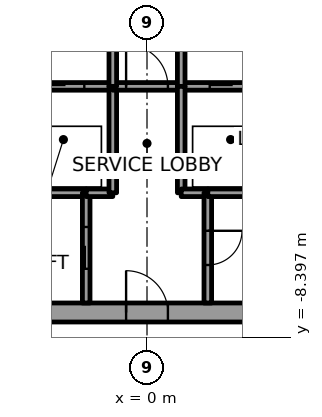
"""IFC4 building model, lengths in metres.
Left out: names, types, materials, properties, quantities, classifications, styles, units other than length and angle.
Written with IfcOpenShell. Run it as: python <this file> out.ifc"""

import sys

from ifc_helpers import new_model, si_unit, direction, frame, frame_2d, origin, place, context, subcontext, project, spatial, rectangle, extrude, element, fill, save


model = new_model("IFC4")
c1 = context("Model", 3, precision=1e-05, world=origin(), true_north=direction((0.0, 1.0)))
c2 = subcontext(c1, "Body", "Model", "MODEL_VIEW")
j1 = project(units=[si_unit("LENGTHUNIT", "METRE"), si_unit("PLANEANGLEUNIT", "RADIAN")], contexts=[c1])
p1 = place(None, origin())
s1 = spatial("IfcSite", under=j1, at=p1, CompositionType="ELEMENT")
p2 = place(p1, origin())
s2 = spatial("IfcBuilding", under=s1, at=p2, CompositionType="ELEMENT")
p3 = place(p2, frame((0.0, 0.0, 92.4)))
s3 = spatial("IfcBuildingStorey", under=s2, at=p3, CompositionType="ELEMENT", Elevation=92.4)
p4 = place(p3, frame((-11.0, -7.75, 0.0), z_axis=(0.0, 0.0, 1.0), x_axis=(1.0, 0.0, 0.0)))
e1 = element("IfcWall", 1, at=p4, inside=s3, PredefinedType="SHEAR", context=c2, shape_type="SweptSolid", body=[
    extrude(rectangle(XDim=22.0, YDim=0.5, at=frame_2d((11.0, 0.0))), origin(), (0.0, 0.0, 1.0), 3.7),
])
p5 = place(p4, frame((10.45, 0.0, 0.0)))
e2 = element("IfcOpeningElement", 2, at=p5, cuts=e1, PredefinedType="OPENING", context=c2, shape_type="SweptSolid", body=[
    extrude(rectangle(XDim=1.1, YDim=2.1, at=frame_2d((0.55, 1.05))), frame((0.0, 0.25, 0.0), z_axis=(0.0, -1.0, 0.0), x_axis=(1.0, 0.0, 0.0)), (0.0, 0.0, 1.0), 0.5),
])
p6 = place(p3, frame((-3.5, -4.6, 0.0), z_axis=(0.0, 0.0, 1.0), x_axis=(1.0, 0.0, 0.0)))
e3 = element("IfcWall", 3, at=p6, inside=s3, PredefinedType="SOLIDWALL", context=c2, shape_type="SweptSolid", body=[
    extrude(rectangle(XDim=1.9, YDim=0.2, at=frame_2d((0.95, 0.0))), origin(), (0.0, 0.0, 1.0), 3.55),
])
p7 = place(p3, frame((-3.5, -1.8, 0.0), z_axis=(0.0, 0.0, 1.0), x_axis=(1.0, 0.0, 0.0)))
e4 = element("IfcWall", 4, at=p7, inside=s3, PredefinedType="SOLIDWALL", context=c2, shape_type="SweptSolid", body=[
    extrude(rectangle(XDim=2.6, YDim=0.2, at=frame_2d((1.3, 0.0))), origin(), (0.0, 0.0, 1.0), 3.55),
])
p8 = place(p7, frame((0.75, 0.0, 0.0)))
e5 = element("IfcOpeningElement", 5, at=p8, cuts=e4, PredefinedType="OPENING", context=c2, shape_type="SweptSolid", body=[
    extrude(rectangle(XDim=1.1, YDim=2.1, at=frame_2d((0.55, 1.05))), frame((0.0, 0.1, 0.0), z_axis=(0.0, -1.0, 0.0), x_axis=(1.0, 0.0, 0.0)), (0.0, 0.0, 1.0), 0.2),
])
p9 = place(p3, frame((-1.6, -7.5, 0.0), z_axis=(0.0, 0.0, 1.0), x_axis=(0.0, 1.0, 0.0)))
e6 = element("IfcWall", 6, at=p9, inside=s3, PredefinedType="SOLIDWALL", context=c2, shape_type="SweptSolid", body=[
    extrude(rectangle(XDim=2.9, YDim=0.2, at=frame_2d((1.45, 0.0))), origin(), (0.0, 0.0, 1.0), 3.55),
])
p10 = place(p9, frame((0.9, 0.0, 0.0)))
e7 = element("IfcOpeningElement", 7, at=p10, cuts=e6, PredefinedType="OPENING", context=c2, shape_type="SweptSolid", body=[
    extrude(rectangle(XDim=1.1, YDim=2.1, at=frame_2d((0.55, 1.05))), frame((0.0, 0.1, 0.0), z_axis=(0.0, -1.0, 0.0), x_axis=(1.0, 0.0, 0.0)), (0.0, 0.0, 1.0), 0.2),
])
p11 = place(p3, frame((-1.6, -4.6, 0.0), z_axis=(0.0, 0.0, 1.0), x_axis=(1.0, 0.0, 0.0)))
e8 = element("IfcWall", 8, at=p11, inside=s3, PredefinedType="SOLIDWALL", context=c2, shape_type="SweptSolid", body=[
    extrude(rectangle(XDim=0.7, YDim=0.2, at=frame_2d((0.35, 0.0))), origin(), (0.0, 0.0, 1.0), 3.55),
])
p12 = place(p3, frame((-0.9, -4.6, 0.0), z_axis=(0.0, 0.0, 1.0), x_axis=(0.0, 1.0, 0.0)))
e9 = element("IfcWall", 9, at=p12, inside=s3, PredefinedType="SOLIDWALL", context=c2, shape_type="SweptSolid", body=[
    extrude(rectangle(XDim=2.8, YDim=0.2, at=frame_2d((1.4, 0.0))), origin(), (0.0, 0.0, 1.0), 3.55),
])
p13 = place(p3, frame((-0.9, -1.8, 0.0), z_axis=(0.0, 0.0, 1.0), x_axis=(1.0, 0.0, 0.0)))
e10 = element("IfcWall", 10, at=p13, inside=s3, PredefinedType="SOLIDWALL", context=c2, shape_type="SweptSolid", body=[
    extrude(rectangle(XDim=1.8, YDim=0.2, at=frame_2d((0.9, 0.0))), origin(), (0.0, 0.0, 1.0), 3.55),
])
p14 = place(p13, frame((0.35, 0.0, 0.0)))
e11 = element("IfcOpeningElement", 11, at=p14, cuts=e10, PredefinedType="OPENING", context=c2, shape_type="SweptSolid", body=[
    extrude(rectangle(XDim=1.1, YDim=2.1, at=frame_2d((0.55, 1.05))), frame((0.0, 0.1, 0.0), z_axis=(0.0, -1.0, 0.0), x_axis=(1.0, 0.0, 0.0)), (0.0, 0.0, 1.0), 0.2),
])
p15 = place(p3, frame((-0.9, 1.8, 0.0), z_axis=(0.0, 0.0, 1.0), x_axis=(0.0, -1.0, 0.0)))
e12 = element("IfcWall", 12, at=p15, inside=s3, PredefinedType="SOLIDWALL", context=c2, shape_type="SweptSolid", body=[
    extrude(rectangle(XDim=3.6, YDim=0.2, at=frame_2d((1.8, 0.0))), origin(), (0.0, 0.0, 1.0), 3.55),
])
p16 = place(p15, frame((1.05, 0.0, 0.0)))
e13 = element("IfcOpeningElement", 13, at=p16, cuts=e12, PredefinedType="OPENING", context=c2, shape_type="SweptSolid", body=[
    extrude(rectangle(XDim=1.5, YDim=2.1, at=frame_2d((0.75, 1.05))), frame((0.0, 0.1, 0.0), z_axis=(0.0, -1.0, 0.0), x_axis=(1.0, 0.0, 0.0)), (0.0, 0.0, 1.0), 0.2),
])
p17 = place(p3, frame((0.9, -1.8, 0.0), z_axis=(0.0, 0.0, 1.0), x_axis=(1.0, 0.0, 0.0)))
e14 = element("IfcWall", 14, at=p17, inside=s3, PredefinedType="SOLIDWALL", context=c2, shape_type="SweptSolid", body=[
    extrude(rectangle(XDim=2.6, YDim=0.2, at=frame_2d((1.3, 0.0))), origin(), (0.0, 0.0, 1.0), 3.55),
])
p18 = place(p17, frame((0.75, 0.0, 0.0)))
e15 = element("IfcOpeningElement", 15, at=p18, cuts=e14, PredefinedType="OPENING", context=c2, shape_type="SweptSolid", body=[
    extrude(rectangle(XDim=1.1, YDim=2.1, at=frame_2d((0.55, 1.05))), frame((0.0, 0.1, 0.0), z_axis=(0.0, -1.0, 0.0), x_axis=(1.0, 0.0, 0.0)), (0.0, 0.0, 1.0), 0.2),
])
p19 = place(p3, frame((0.9, -1.8, 0.0), z_axis=(0.0, 0.0, 1.0), x_axis=(0.0, 1.0, 0.0)))
e16 = element("IfcWall", 16, at=p19, inside=s3, PredefinedType="SOLIDWALL", context=c2, shape_type="SweptSolid", body=[
    extrude(rectangle(XDim=3.6, YDim=0.2, at=frame_2d((1.8, 0.0))), origin(), (0.0, 0.0, 1.0), 3.55),
])
p20 = place(p19, frame((1.05, 0.0, 0.0)))
e17 = element("IfcOpeningElement", 17, at=p20, cuts=e16, PredefinedType="OPENING", context=c2, shape_type="SweptSolid", body=[
    extrude(rectangle(XDim=1.5, YDim=2.1, at=frame_2d((0.75, 1.05))), frame((0.0, 0.1, 0.0), z_axis=(0.0, -1.0, 0.0), x_axis=(1.0, 0.0, 0.0)), (0.0, 0.0, 1.0), 0.2),
])
p21 = place(p3, frame((0.9, -1.8, 0.0), z_axis=(0.0, 0.0, 1.0), x_axis=(0.0, -1.0, 0.0)))
e18 = element("IfcWall", 18, at=p21, inside=s3, PredefinedType="SOLIDWALL", context=c2, shape_type="SweptSolid", body=[
    extrude(rectangle(XDim=2.8, YDim=0.2, at=frame_2d((1.4, 0.0))), origin(), (0.0, 0.0, 1.0), 3.55),
])
p22 = place(p3, frame((0.9, -4.6, 0.0), z_axis=(0.0, 0.0, 1.0), x_axis=(1.0, 0.0, 0.0)))
e19 = element("IfcWall", 19, at=p22, inside=s3, PredefinedType="SOLIDWALL", context=c2, shape_type="SweptSolid", body=[
    extrude(rectangle(XDim=0.7, YDim=0.2, at=frame_2d((0.35, 0.0))), origin(), (0.0, 0.0, 1.0), 3.55),
])
p23 = place(p3, frame((1.6, -4.6, 0.0), z_axis=(0.0, 0.0, 1.0), x_axis=(0.0, -1.0, 0.0)))
e20 = element("IfcWall", 20, at=p23, inside=s3, PredefinedType="SOLIDWALL", context=c2, shape_type="SweptSolid", body=[
    extrude(rectangle(XDim=2.9, YDim=0.2, at=frame_2d((1.45, 0.0))), origin(), (0.0, 0.0, 1.0), 3.55),
])
p24 = place(p23, frame((1.0, 0.0, 0.0)))
e21 = element("IfcOpeningElement", 21, at=p24, cuts=e20, PredefinedType="OPENING", context=c2, shape_type="SweptSolid", body=[
    extrude(rectangle(XDim=0.9, YDim=2.1, at=frame_2d((0.45, 1.05))), frame((0.0, 0.1, 0.0), z_axis=(0.0, -1.0, 0.0), x_axis=(1.0, 0.0, 0.0)), (0.0, 0.0, 1.0), 0.2),
])
p25 = place(p3, frame((3.5, -4.6, 0.0), z_axis=(0.0, 0.0, 1.0), x_axis=(-1.0, 0.0, 0.0)))
e22 = element("IfcWall", 22, at=p25, inside=s3, PredefinedType="SOLIDWALL", context=c2, shape_type="SweptSolid", body=[
    extrude(rectangle(XDim=1.9, YDim=0.2, at=frame_2d((0.95, 0.0))), origin(), (0.0, 0.0, 1.0), 3.55),
])
p26 = place(p8, origin())
e23 = element("IfcDoor", 23, at=p26, inside=s3, OperationType="SLIDING_TO_LEFT", PredefinedType="DOOR", context=c2, shape_type="SweptSolid", body=[
    extrude(rectangle(XDim=1.1, YDim=2.1, at=frame_2d((0.55, 1.05))), frame((0.0, 0.025, 0.0), z_axis=(0.0, -1.0, 0.0), x_axis=(1.0, 0.0, 0.0)), (0.0, 0.0, 1.0), 0.05),
])
fill(e5, e23)
p27 = place(p18, origin())
e24 = element("IfcDoor", 24, at=p27, inside=s3, OperationType="SLIDING_TO_RIGHT", PredefinedType="DOOR", context=c2, shape_type="SweptSolid", body=[
    extrude(rectangle(XDim=1.1, YDim=2.1, at=frame_2d((0.55, 1.05))), frame((0.0, 0.025, 0.0), z_axis=(0.0, -1.0, 0.0), x_axis=(1.0, 0.0, 0.0)), (0.0, 0.0, 1.0), 0.05),
])
fill(e15, e24)
p28 = place(p10, origin())
e25 = element("IfcDoor", 25, at=p28, inside=s3, OperationType="SLIDING_TO_LEFT", PredefinedType="DOOR", context=c2, shape_type="SweptSolid", body=[
    extrude(rectangle(XDim=1.1, YDim=2.1, at=frame_2d((0.55, 1.05))), frame((0.0, 0.025, 0.0), z_axis=(0.0, -1.0, 0.0), x_axis=(1.0, 0.0, 0.0)), (0.0, 0.0, 1.0), 0.05),
])
fill(e7, e25)
p29 = place(p14, origin())
e26 = element("IfcDoor", 26, at=p29, inside=s3, OperationType="SINGLE_SWING_RIGHT", PredefinedType="DOOR", context=c2, shape_type="SweptSolid", body=[
    extrude(rectangle(XDim=1.1, YDim=2.1, at=frame_2d((0.55, 1.05))), frame((0.0, 0.025, 0.0), z_axis=(0.0, -1.0, 0.0), x_axis=(1.0, 0.0, 0.0)), (0.0, 0.0, 1.0), 0.05),
])
fill(e11, e26)
p30 = place(p24, origin())
e27 = element("IfcDoor", 27, at=p30, inside=s3, OperationType="SINGLE_SWING_LEFT", PredefinedType="DOOR", context=c2, shape_type="SweptSolid", body=[
    extrude(rectangle(XDim=0.9, YDim=2.1, at=frame_2d((0.45, 1.05))), frame((0.0, 0.025, 0.0), z_axis=(0.0, -1.0, 0.0), x_axis=(1.0, 0.0, 0.0)), (0.0, 0.0, 1.0), 0.05),
])
fill(e21, e27)
p31 = place(p5, origin())
e28 = element("IfcDoor", 28, at=p31, inside=s3, OperationType="SINGLE_SWING_RIGHT", PredefinedType="DOOR", context=c2, shape_type="SweptSolid", body=[
    extrude(rectangle(XDim=1.1, YDim=2.1, at=frame_2d((0.55, 1.05))), frame((0.0, 0.025, 0.0), z_axis=(0.0, -1.0, 0.0), x_axis=(1.0, 0.0, 0.0)), (0.0, 0.0, 1.0), 0.05),
])
fill(e2, e28)
save(model, sys.argv[1])
